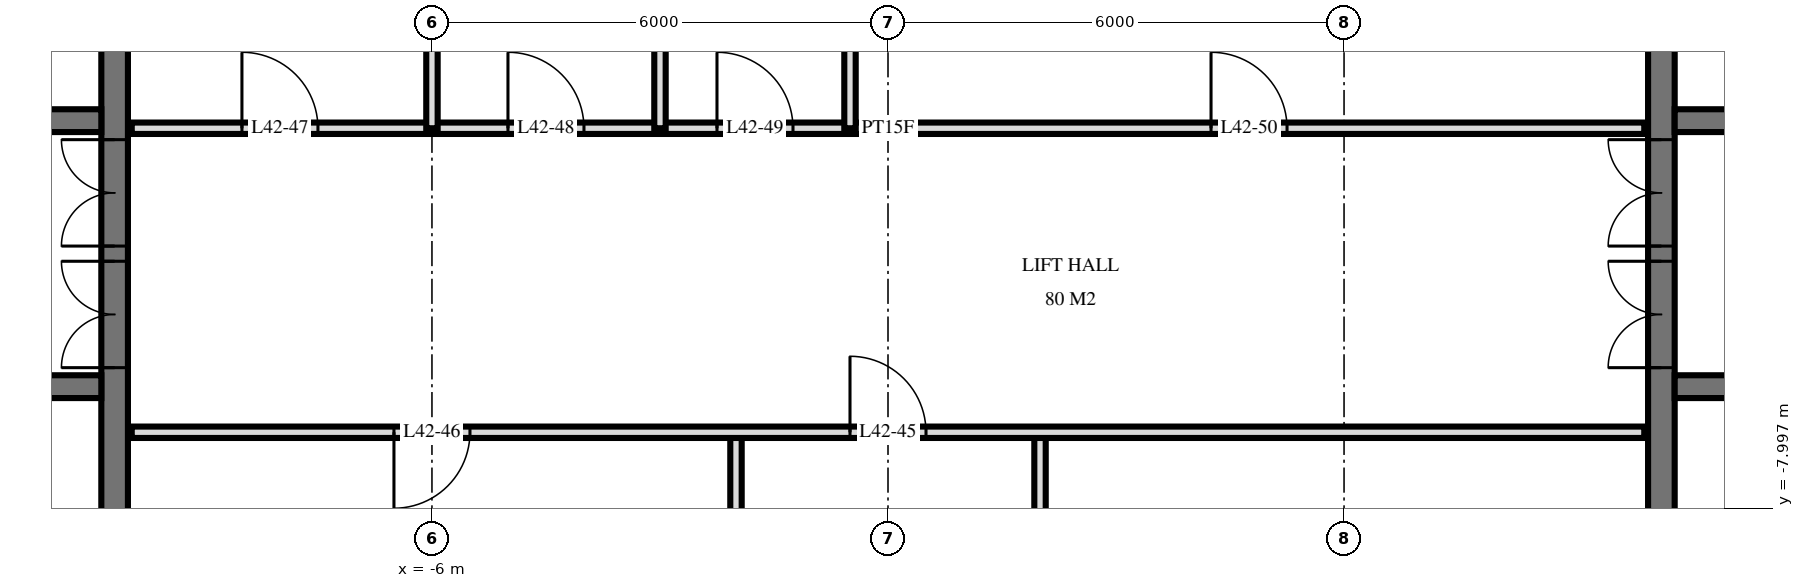
"""IFC4 building model, lengths in metres.
Left out: names, types, materials, properties, quantities, classifications, styles, units other than length and angle.
Written with IfcOpenShell. Run it as: python <this file> out.ifc"""

import sys

from ifc_helpers import new_model, si_unit, direction, frame, frame_2d, origin, place, context, subcontext, project, spatial, rectangle, extrude, element, fill, save


model = new_model("IFC4")
c1 = context("Model", 3, precision=1e-05, world=origin(), true_north=direction((0.0, 1.0)))
c2 = subcontext(c1, "Body", "Model", "MODEL_VIEW")
j1 = project(units=[si_unit("LENGTHUNIT", "METRE"), si_unit("PLANEANGLEUNIT", "RADIAN")], contexts=[c1])
p1 = place(None, origin())
s1 = spatial("IfcSite", under=j1, at=p1, CompositionType="ELEMENT")
p2 = place(p1, origin())
s2 = spatial("IfcBuilding", under=s1, at=p2, CompositionType="ELEMENT")
p3 = place(p2, frame((0.0, 0.0, 163.2)))
s3 = spatial("IfcBuildingStorey", under=s2, at=p3, CompositionType="ELEMENT", Elevation=163.2)
p4 = place(p3, frame((-10.175, -14.55, 0.0), z_axis=(0.0, 0.0, 1.0), x_axis=(0.0, 1.0, 0.0)))
e1 = element("IfcWall", 1, at=p4, inside=s3, PredefinedType="SHEAR", context=c2, shape_type="SweptSolid", body=[
    extrude(rectangle(XDim=14.1, YDim=0.35, at=frame_2d((7.05, 0.0))), origin(), (0.0, 0.0, 1.0), 3.6),
])
p5 = place(p4, frame((8.4, 0.0, 0.0)))
e2 = element("IfcOpeningElement", 2, at=p5, cuts=e1, PredefinedType="OPENING", context=c2, shape_type="SweptSolid", body=[
    extrude(rectangle(XDim=1.4, YDim=2.4, at=frame_2d((0.7, 1.2))), frame((0.0, 0.185, 0.0), z_axis=(0.0, -1.0, 0.0), x_axis=(1.0, 0.0, 0.0)), (0.0, 0.0, 1.0), 0.37),
])
p6 = place(p4, frame((10.0, 0.0, 0.0)))
e3 = element("IfcOpeningElement", 3, at=p6, cuts=e1, PredefinedType="OPENING", context=c2, shape_type="SweptSolid", body=[
    extrude(rectangle(XDim=1.4, YDim=2.4, at=frame_2d((0.7, 1.2))), frame((0.0, 0.185, 0.0), z_axis=(0.0, -1.0, 0.0), x_axis=(1.0, 0.0, 0.0)), (0.0, 0.0, 1.0), 0.37),
])
p7 = place(p4, frame((4.0, 0.0, 0.0)))
e4 = element("IfcOpeningElement", 4, at=p7, cuts=e1, PredefinedType="OPENING", context=c2, shape_type="SweptSolid", body=[
    extrude(rectangle(XDim=1.2, YDim=2.1, at=frame_2d((0.6, 1.05))), frame((0.0, 0.185, 0.0), z_axis=(0.0, -1.0, 0.0), x_axis=(1.0, 0.0, 0.0)), (0.0, 0.0, 1.0), 0.37),
])
p8 = place(p3, frame((-24.05, -2.9, 0.0), z_axis=(0.0, 0.0, 1.0), x_axis=(1.0, 0.0, 0.0)))
e5 = element("IfcWall", 5, at=p8, inside=s3, PredefinedType="SHEAR", context=c2, shape_type="SweptSolid", body=[
    extrude(rectangle(XDim=13.7, YDim=0.3, at=frame_2d((6.85, 0.0))), origin(), (0.0, 0.0, 1.0), 3.6),
])
p9 = place(p8, frame((0.55, 0.0, 0.0)))
e6 = element("IfcOpeningElement", 6, at=p9, cuts=e5, PredefinedType="OPENING", context=c2, shape_type="SweptSolid", body=[
    extrude(rectangle(XDim=1.1, YDim=2.1, at=frame_2d((0.55, 1.05))), frame((0.0, 0.16, 0.0), z_axis=(0.0, -1.0, 0.0), x_axis=(1.0, 0.0, 0.0)), (0.0, 0.0, 1.0), 0.32),
])
p10 = place(p8, frame((6.863, 0.0, 0.0)))
e7 = element("IfcOpeningElement", 7, at=p10, cuts=e5, PredefinedType="OPENING", context=c2, shape_type="SweptSolid", body=[
    extrude(rectangle(XDim=0.9, YDim=2.1, at=frame_2d((0.45, 1.05))), frame((0.0, 0.16, 0.0), z_axis=(0.0, -1.0, 0.0), x_axis=(1.0, 0.0, 0.0)), (0.0, 0.0, 1.0), 0.32),
])
p11 = place(p8, frame((5.438, 0.0, 0.0)))
e8 = element("IfcOpeningElement", 8, at=p11, cuts=e5, PredefinedType="OPENING", context=c2, shape_type="SweptSolid", body=[
    extrude(rectangle(XDim=0.9, YDim=2.1, at=frame_2d((0.45, 1.05))), frame((0.0, 0.16, 0.0), z_axis=(0.0, -1.0, 0.0), x_axis=(1.0, 0.0, 0.0)), (0.0, 0.0, 1.0), 0.32),
])
p12 = place(p8, frame((11.85, 0.0, 0.0)))
e9 = element("IfcOpeningElement", 9, at=p12, cuts=e5, PredefinedType="OPENING", context=c2, shape_type="SweptSolid", body=[
    extrude(rectangle(XDim=1.0, YDim=2.1, at=frame_2d((0.5, 1.05))), frame((0.0, 0.16, 0.0), z_axis=(0.0, -1.0, 0.0), x_axis=(1.0, 0.0, 0.0)), (0.0, 0.0, 1.0), 0.32),
])
p13 = place(p8, frame((9.562, 0.0, 0.0)))
e10 = element("IfcOpeningElement", 10, at=p13, cuts=e5, PredefinedType="OPENING", context=c2, shape_type="SweptSolid", body=[
    extrude(rectangle(XDim=1.0, YDim=2.1, at=frame_2d((0.5, 1.05))), frame((0.0, 0.16, 0.0), z_axis=(0.0, -1.0, 0.0), x_axis=(1.0, 0.0, 0.0)), (0.0, 0.0, 1.0), 0.32),
])
p14 = place(p8, frame((8.137, 0.0, 0.0)))
e11 = element("IfcOpeningElement", 11, at=p14, cuts=e5, PredefinedType="OPENING", context=c2, shape_type="SweptSolid", body=[
    extrude(rectangle(XDim=1.0, YDim=2.1, at=frame_2d((0.5, 1.05))), frame((0.0, 0.16, 0.0), z_axis=(0.0, -1.0, 0.0), x_axis=(1.0, 0.0, 0.0)), (0.0, 0.0, 1.0), 0.32),
])
p15 = place(p8, frame((3.0, 0.0, 0.0)))
e12 = element("IfcOpeningElement", 12, at=p15, cuts=e5, PredefinedType="OPENING", context=c2, shape_type="SweptSolid", body=[
    extrude(rectangle(XDim=1.0, YDim=2.1, at=frame_2d((0.5, 1.05))), frame((0.0, 0.16, 0.0), z_axis=(0.0, -1.0, 0.0), x_axis=(1.0, 0.0, 0.0)), (0.0, 0.0, 1.0), 0.32),
])
p16 = place(p3, frame((-24.05, -6.4, 0.0), z_axis=(0.0, 0.0, 1.0), x_axis=(1.0, 0.0, 0.0)))
e13 = element("IfcWall", 13, at=p16, inside=s3, PredefinedType="SHEAR", context=c2, shape_type="SweptSolid", body=[
    extrude(rectangle(XDim=13.7, YDim=0.3, at=frame_2d((6.85, 0.0))), origin(), (0.0, 0.0, 1.0), 3.6),
])
p17 = place(p16, frame((0.55, 0.0, 0.0)))
e14 = element("IfcOpeningElement", 14, at=p17, cuts=e13, PredefinedType="OPENING", context=c2, shape_type="SweptSolid", body=[
    extrude(rectangle(XDim=1.1, YDim=2.1, at=frame_2d((0.55, 1.05))), frame((0.0, 0.16, 0.0), z_axis=(0.0, -1.0, 0.0), x_axis=(1.0, 0.0, 0.0)), (0.0, 0.0, 1.0), 0.32),
])
p18 = place(p16, frame((5.8, 0.0, 0.0)))
e15 = element("IfcOpeningElement", 15, at=p18, cuts=e13, PredefinedType="OPENING", context=c2, shape_type="SweptSolid", body=[
    extrude(rectangle(XDim=1.1, YDim=2.1, at=frame_2d((0.55, 1.05))), frame((0.0, 0.16, 0.0), z_axis=(0.0, -1.0, 0.0), x_axis=(1.0, 0.0, 0.0)), (0.0, 0.0, 1.0), 0.32),
])
p19 = place(p3, frame((10.175, -14.55, 0.0), z_axis=(0.0, 0.0, 1.0), x_axis=(0.0, 1.0, 0.0)))
e16 = element("IfcWall", 16, at=p19, inside=s3, PredefinedType="SHEAR", context=c2, shape_type="SweptSolid", body=[
    extrude(rectangle(XDim=14.1, YDim=0.35, at=frame_2d((7.05, 0.0))), origin(), (0.0, 0.0, 1.0), 3.6),
])
p20 = place(p19, frame((8.4, 0.0, 0.0)))
e17 = element("IfcOpeningElement", 17, at=p20, cuts=e16, PredefinedType="OPENING", context=c2, shape_type="SweptSolid", body=[
    extrude(rectangle(XDim=1.4, YDim=2.4, at=frame_2d((0.7, 1.2))), frame((0.0, 0.185, 0.0), z_axis=(0.0, -1.0, 0.0), x_axis=(1.0, 0.0, 0.0)), (0.0, 0.0, 1.0), 0.37),
])
p21 = place(p19, frame((10.0, 0.0, 0.0)))
e18 = element("IfcOpeningElement", 18, at=p21, cuts=e16, PredefinedType="OPENING", context=c2, shape_type="SweptSolid", body=[
    extrude(rectangle(XDim=1.4, YDim=2.4, at=frame_2d((0.7, 1.2))), frame((0.0, 0.185, 0.0), z_axis=(0.0, -1.0, 0.0), x_axis=(1.0, 0.0, 0.0)), (0.0, 0.0, 1.0), 0.37),
])
p22 = place(p19, frame((4.0, 0.0, 0.0)))
e19 = element("IfcOpeningElement", 19, at=p22, cuts=e16, PredefinedType="OPENING", context=c2, shape_type="SweptSolid", body=[
    extrude(rectangle(XDim=1.2, YDim=2.1, at=frame_2d((0.6, 1.05))), frame((0.0, 0.185, 0.0), z_axis=(0.0, -1.0, 0.0), x_axis=(1.0, 0.0, 0.0)), (0.0, 0.0, 1.0), 0.37),
])
p23 = place(p3, frame((10.35, -2.9, 0.0), z_axis=(0.0, 0.0, 1.0), x_axis=(1.0, 0.0, 0.0)))
e20 = element("IfcWall", 20, at=p23, inside=s3, PredefinedType="SHEAR", context=c2, shape_type="SweptSolid", body=[
    extrude(rectangle(XDim=13.7, YDim=0.3, at=frame_2d((6.85, 0.0))), origin(), (0.0, 0.0, 1.0), 3.6),
])
p24 = place(p23, frame((12.05, 0.0, 0.0)))
e21 = element("IfcOpeningElement", 21, at=p24, cuts=e20, PredefinedType="OPENING", context=c2, shape_type="SweptSolid", body=[
    extrude(rectangle(XDim=1.1, YDim=2.1, at=frame_2d((0.55, 1.05))), frame((0.0, 0.16, 0.0), z_axis=(0.0, -1.0, 0.0), x_axis=(1.0, 0.0, 0.0)), (0.0, 0.0, 1.0), 0.32),
])
p25 = place(p23, frame((5.938, 0.0, 0.0)))
e22 = element("IfcOpeningElement", 22, at=p25, cuts=e20, PredefinedType="OPENING", context=c2, shape_type="SweptSolid", body=[
    extrude(rectangle(XDim=0.9, YDim=2.1, at=frame_2d((0.45, 1.05))), frame((0.0, 0.16, 0.0), z_axis=(0.0, -1.0, 0.0), x_axis=(1.0, 0.0, 0.0)), (0.0, 0.0, 1.0), 0.32),
])
p26 = place(p23, frame((7.363, 0.0, 0.0)))
e23 = element("IfcOpeningElement", 23, at=p26, cuts=e20, PredefinedType="OPENING", context=c2, shape_type="SweptSolid", body=[
    extrude(rectangle(XDim=0.9, YDim=2.1, at=frame_2d((0.45, 1.05))), frame((0.0, 0.16, 0.0), z_axis=(0.0, -1.0, 0.0), x_axis=(1.0, 0.0, 0.0)), (0.0, 0.0, 1.0), 0.32),
])
p27 = place(p23, frame((0.85, 0.0, 0.0)))
e24 = element("IfcOpeningElement", 24, at=p27, cuts=e20, PredefinedType="OPENING", context=c2, shape_type="SweptSolid", body=[
    extrude(rectangle(XDim=1.0, YDim=2.1, at=frame_2d((0.5, 1.05))), frame((0.0, 0.16, 0.0), z_axis=(0.0, -1.0, 0.0), x_axis=(1.0, 0.0, 0.0)), (0.0, 0.0, 1.0), 0.32),
])
p28 = place(p23, frame((3.137, 0.0, 0.0)))
e25 = element("IfcOpeningElement", 25, at=p28, cuts=e20, PredefinedType="OPENING", context=c2, shape_type="SweptSolid", body=[
    extrude(rectangle(XDim=1.0, YDim=2.1, at=frame_2d((0.5, 1.05))), frame((0.0, 0.16, 0.0), z_axis=(0.0, -1.0, 0.0), x_axis=(1.0, 0.0, 0.0)), (0.0, 0.0, 1.0), 0.32),
])
p29 = place(p23, frame((4.562, 0.0, 0.0)))
e26 = element("IfcOpeningElement", 26, at=p29, cuts=e20, PredefinedType="OPENING", context=c2, shape_type="SweptSolid", body=[
    extrude(rectangle(XDim=1.0, YDim=2.1, at=frame_2d((0.5, 1.05))), frame((0.0, 0.16, 0.0), z_axis=(0.0, -1.0, 0.0), x_axis=(1.0, 0.0, 0.0)), (0.0, 0.0, 1.0), 0.32),
])
p30 = place(p23, frame((9.7, 0.0, 0.0)))
e27 = element("IfcOpeningElement", 27, at=p30, cuts=e20, PredefinedType="OPENING", context=c2, shape_type="SweptSolid", body=[
    extrude(rectangle(XDim=1.0, YDim=2.1, at=frame_2d((0.5, 1.05))), frame((0.0, 0.16, 0.0), z_axis=(0.0, -1.0, 0.0), x_axis=(1.0, 0.0, 0.0)), (0.0, 0.0, 1.0), 0.32),
])
p31 = place(p3, frame((10.35, -6.4, 0.0), z_axis=(0.0, 0.0, 1.0), x_axis=(1.0, 0.0, 0.0)))
e28 = element("IfcWall", 28, at=p31, inside=s3, PredefinedType="SHEAR", context=c2, shape_type="SweptSolid", body=[
    extrude(rectangle(XDim=13.7, YDim=0.3, at=frame_2d((6.85, 0.0))), origin(), (0.0, 0.0, 1.0), 3.6),
])
p32 = place(p31, frame((12.05, 0.0, 0.0)))
e29 = element("IfcOpeningElement", 29, at=p32, cuts=e28, PredefinedType="OPENING", context=c2, shape_type="SweptSolid", body=[
    extrude(rectangle(XDim=1.1, YDim=2.1, at=frame_2d((0.55, 1.05))), frame((0.0, 0.16, 0.0), z_axis=(0.0, -1.0, 0.0), x_axis=(1.0, 0.0, 0.0)), (0.0, 0.0, 1.0), 0.32),
])
p33 = place(p31, frame((6.8, 0.0, 0.0)))
e30 = element("IfcOpeningElement", 30, at=p33, cuts=e28, PredefinedType="OPENING", context=c2, shape_type="SweptSolid", body=[
    extrude(rectangle(XDim=1.1, YDim=2.1, at=frame_2d((0.55, 1.05))), frame((0.0, 0.16, 0.0), z_axis=(0.0, -1.0, 0.0), x_axis=(1.0, 0.0, 0.0)), (0.0, 0.0, 1.0), 0.32),
])
p34 = place(p3, frame((2.0, -11.0, 0.0), z_axis=(0.0, 0.0, 1.0), x_axis=(0.0, 1.0, 0.0)))
e31 = element("IfcWall", 31, at=p34, inside=s3, PredefinedType="PARTITIONING", context=c2, shape_type="SweptSolid", body=[
    extrude(rectangle(XDim=4.0, YDim=0.15, at=frame_2d((2.0, 0.0))), origin(), (0.0, 0.0, 1.0), 3.32),
])
p35 = place(p3, frame((-0.5, -3.0, 0.0), z_axis=(0.0, 0.0, 1.0), x_axis=(0.0, 1.0, 0.0)))
e32 = element("IfcWall", 32, at=p35, inside=s3, PredefinedType="PLUMBINGWALL", context=c2, shape_type="SweptSolid", body=[
    extrude(rectangle(XDim=4.02, YDim=0.15, at=frame_2d((2.01, 0.0))), origin(), (0.0, 0.0, 1.0), 3.32),
])
p36 = place(p3, frame((-2.0, -11.0, 0.0), z_axis=(0.0, 0.0, 1.0), x_axis=(0.0, 1.0, 0.0)))
e33 = element("IfcWall", 33, at=p36, inside=s3, PredefinedType="PARTITIONING", context=c2, shape_type="SweptSolid", body=[
    extrude(rectangle(XDim=4.0, YDim=0.15, at=frame_2d((2.0, 0.0))), origin(), (0.0, 0.0, 1.0), 3.32),
])
for number, where, z_axis, x_axis in (
    (34, (-3.0, -3.0, 0.0), (0.0, 0.0, 1.0), (0.0, 1.0, 0.0)),
    (35, (-6.0, -3.0, 0.0), (0.0, 0.0, 1.0), (0.0, 1.0, 0.0)),
):
    element("IfcWall", number, at=place(p3, frame(where, z_axis=z_axis, x_axis=x_axis)), inside=s3, PredefinedType="PLUMBINGWALL", context=c2, shape_type="SweptSolid", body=[
        extrude(rectangle(XDim=4.02, YDim=0.15, at=frame_2d((2.01, 0.0))), origin(), (0.0, 0.0, 1.0), 3.32),
    ])
p37 = place(p3, frame((-9.95, -7.0, 0.0), z_axis=(0.0, 0.0, 1.0), x_axis=(1.0, 0.0, 0.0)))
e36 = element("IfcWall", 36, at=p37, inside=s3, PredefinedType="PARTITIONING", context=c2, shape_type="SweptSolid", body=[
    extrude(rectangle(XDim=19.9, YDim=0.15, at=frame_2d((9.95, 0.0))), origin(), (0.0, 0.0, 1.0), 3.32),
])
p38 = place(p37, frame((9.45, 0.0, 0.0)))
e37 = element("IfcOpeningElement", 37, at=p38, cuts=e36, PredefinedType="OPENING", context=c2, shape_type="SweptSolid", body=[
    extrude(rectangle(XDim=1.0, YDim=2.1, at=frame_2d((0.5, 1.05))), frame((0.0, 0.085, 0.0), z_axis=(0.0, -1.0, 0.0), x_axis=(1.0, 0.0, 0.0)), (0.0, 0.0, 1.0), 0.17),
])
p39 = place(p37, frame((3.45, 0.0, 0.0)))
e38 = element("IfcOpeningElement", 38, at=p39, cuts=e36, PredefinedType="OPENING", context=c2, shape_type="SweptSolid", body=[
    extrude(rectangle(XDim=1.0, YDim=2.1, at=frame_2d((0.5, 1.05))), frame((0.0, 0.085, 0.0), z_axis=(0.0, -1.0, 0.0), x_axis=(1.0, 0.0, 0.0)), (0.0, 0.0, 1.0), 0.17),
])
p40 = place(p3, frame((-9.95, -3.0, 0.0), z_axis=(0.0, 0.0, 1.0), x_axis=(1.0, 0.0, 0.0)))
e39 = element("IfcWall", 39, at=p40, inside=s3, PredefinedType="PARTITIONING", context=c2, shape_type="SweptSolid", body=[
    extrude(rectangle(XDim=19.9, YDim=0.15, at=frame_2d((9.95, 0.0))), origin(), (0.0, 0.0, 1.0), 3.32),
])
p41 = place(p40, frame((1.45, 0.0, 0.0)))
e40 = element("IfcOpeningElement", 40, at=p41, cuts=e39, PredefinedType="OPENING", context=c2, shape_type="SweptSolid", body=[
    extrude(rectangle(XDim=1.0, YDim=2.1, at=frame_2d((0.5, 1.05))), frame((0.0, 0.085, 0.0), z_axis=(0.0, -1.0, 0.0), x_axis=(1.0, 0.0, 0.0)), (0.0, 0.0, 1.0), 0.17),
])
p42 = place(p40, frame((4.95, 0.0, 0.0)))
e41 = element("IfcOpeningElement", 41, at=p42, cuts=e39, PredefinedType="OPENING", context=c2, shape_type="SweptSolid", body=[
    extrude(rectangle(XDim=1.0, YDim=2.1, at=frame_2d((0.5, 1.05))), frame((0.0, 0.085, 0.0), z_axis=(0.0, -1.0, 0.0), x_axis=(1.0, 0.0, 0.0)), (0.0, 0.0, 1.0), 0.17),
])
p43 = place(p40, frame((7.7, 0.0, 0.0)))
e42 = element("IfcOpeningElement", 42, at=p43, cuts=e39, PredefinedType="OPENING", context=c2, shape_type="SweptSolid", body=[
    extrude(rectangle(XDim=1.0, YDim=2.1, at=frame_2d((0.5, 1.05))), frame((0.0, 0.085, 0.0), z_axis=(0.0, -1.0, 0.0), x_axis=(1.0, 0.0, 0.0)), (0.0, 0.0, 1.0), 0.17),
])
p44 = place(p40, frame((14.2, 0.0, 0.0)))
e43 = element("IfcOpeningElement", 43, at=p44, cuts=e39, PredefinedType="OPENING", context=c2, shape_type="SweptSolid", body=[
    extrude(rectangle(XDim=1.0, YDim=2.1, at=frame_2d((0.5, 1.05))), frame((0.0, 0.085, 0.0), z_axis=(0.0, -1.0, 0.0), x_axis=(1.0, 0.0, 0.0)), (0.0, 0.0, 1.0), 0.17),
])
p45 = place(p5, origin())
e44 = element("IfcDoor", 44, at=p45, inside=s3, OperationType="DOUBLE_DOOR_SINGLE_SWING", PredefinedType="DOOR", context=c2, shape_type="SweptSolid", body=[
    extrude(rectangle(XDim=1.4, YDim=2.4, at=frame_2d((0.7, 1.2))), frame((0.0, 0.025, 0.0), z_axis=(0.0, -1.0, 0.0), x_axis=(1.0, 0.0, 0.0)), (0.0, 0.0, 1.0), 0.05),
])
fill(e2, e44)
p46 = place(p6, origin())
e45 = element("IfcDoor", 45, at=p46, inside=s3, OperationType="DOUBLE_DOOR_SINGLE_SWING", PredefinedType="DOOR", context=c2, shape_type="SweptSolid", body=[
    extrude(rectangle(XDim=1.4, YDim=2.4, at=frame_2d((0.7, 1.2))), frame((0.0, 0.025, 0.0), z_axis=(0.0, -1.0, 0.0), x_axis=(1.0, 0.0, 0.0)), (0.0, 0.0, 1.0), 0.05),
])
fill(e3, e45)
p47 = place(p20, origin())
e46 = element("IfcDoor", 46, at=p47, inside=s3, OperationType="DOUBLE_DOOR_SINGLE_SWING", PredefinedType="DOOR", context=c2, shape_type="SweptSolid", body=[
    extrude(rectangle(XDim=1.4, YDim=2.4, at=frame_2d((0.7, 1.2))), frame((0.0, 0.025, 0.0), z_axis=(0.0, -1.0, 0.0), x_axis=(1.0, 0.0, 0.0)), (0.0, 0.0, 1.0), 0.05),
])
fill(e17, e46)
p48 = place(p21, origin())
e47 = element("IfcDoor", 47, at=p48, inside=s3, OperationType="DOUBLE_DOOR_SINGLE_SWING", PredefinedType="DOOR", context=c2, shape_type="SweptSolid", body=[
    extrude(rectangle(XDim=1.4, YDim=2.4, at=frame_2d((0.7, 1.2))), frame((0.0, 0.025, 0.0), z_axis=(0.0, -1.0, 0.0), x_axis=(1.0, 0.0, 0.0)), (0.0, 0.0, 1.0), 0.05),
])
fill(e18, e47)
p49 = place(p38, origin())
e48 = element("IfcDoor", 48, at=p49, inside=s3, OperationType="SINGLE_SWING_RIGHT", PredefinedType="DOOR", context=c2, shape_type="SweptSolid", body=[
    extrude(rectangle(XDim=1.0, YDim=2.1, at=frame_2d((0.5, 1.05))), frame((0.0, 0.025, 0.0), z_axis=(0.0, -1.0, 0.0), x_axis=(1.0, 0.0, 0.0)), (0.0, 0.0, 1.0), 0.05),
])
fill(e37, e48)
p50 = place(p39, frame((0.5, 0.0, 0.0), z_axis=(0.0, 0.0, 1.0), x_axis=(-1.0, 0.0, 0.0)))
e49 = element("IfcDoor", 49, at=p50, inside=s3, OperationType="SINGLE_SWING_LEFT", PredefinedType="DOOR", context=c2, shape_type="SweptSolid", body=[
    extrude(rectangle(XDim=1.0, YDim=2.1, at=frame_2d((0.0, 1.05))), frame((0.0, -0.025, 0.0), z_axis=(0.0, 1.0, 0.0), x_axis=(-1.0, 0.0, 0.0)), (0.0, 0.0, 1.0), 0.05),
])
fill(e38, e49)
p51 = place(p41, origin())
e50 = element("IfcDoor", 50, at=p51, inside=s3, OperationType="SINGLE_SWING_RIGHT", PredefinedType="DOOR", context=c2, shape_type="SweptSolid", body=[
    extrude(rectangle(XDim=1.0, YDim=2.1, at=frame_2d((0.5, 1.05))), frame((0.0, 0.025, 0.0), z_axis=(0.0, -1.0, 0.0), x_axis=(1.0, 0.0, 0.0)), (0.0, 0.0, 1.0), 0.05),
])
fill(e40, e50)
p52 = place(p42, origin())
e51 = element("IfcDoor", 51, at=p52, inside=s3, OperationType="SINGLE_SWING_RIGHT", PredefinedType="DOOR", context=c2, shape_type="SweptSolid", body=[
    extrude(rectangle(XDim=1.0, YDim=2.1, at=frame_2d((0.5, 1.05))), frame((0.0, 0.025, 0.0), z_axis=(0.0, -1.0, 0.0), x_axis=(1.0, 0.0, 0.0)), (0.0, 0.0, 1.0), 0.05),
])
fill(e41, e51)
p53 = place(p43, origin())
e52 = element("IfcDoor", 52, at=p53, inside=s3, OperationType="SINGLE_SWING_RIGHT", PredefinedType="DOOR", context=c2, shape_type="SweptSolid", body=[
    extrude(rectangle(XDim=1.0, YDim=2.1, at=frame_2d((0.5, 1.05))), frame((0.0, 0.025, 0.0), z_axis=(0.0, -1.0, 0.0), x_axis=(1.0, 0.0, 0.0)), (0.0, 0.0, 1.0), 0.05),
])
fill(e42, e52)
p54 = place(p44, origin())
e53 = element("IfcDoor", 53, at=p54, inside=s3, OperationType="SINGLE_SWING_RIGHT", PredefinedType="DOOR", context=c2, shape_type="SweptSolid", body=[
    extrude(rectangle(XDim=1.0, YDim=2.1, at=frame_2d((0.5, 1.05))), frame((0.0, 0.025, 0.0), z_axis=(0.0, -1.0, 0.0), x_axis=(1.0, 0.0, 0.0)), (0.0, 0.0, 1.0), 0.05),
])
fill(e43, e53)
save(model, sys.argv[1])
